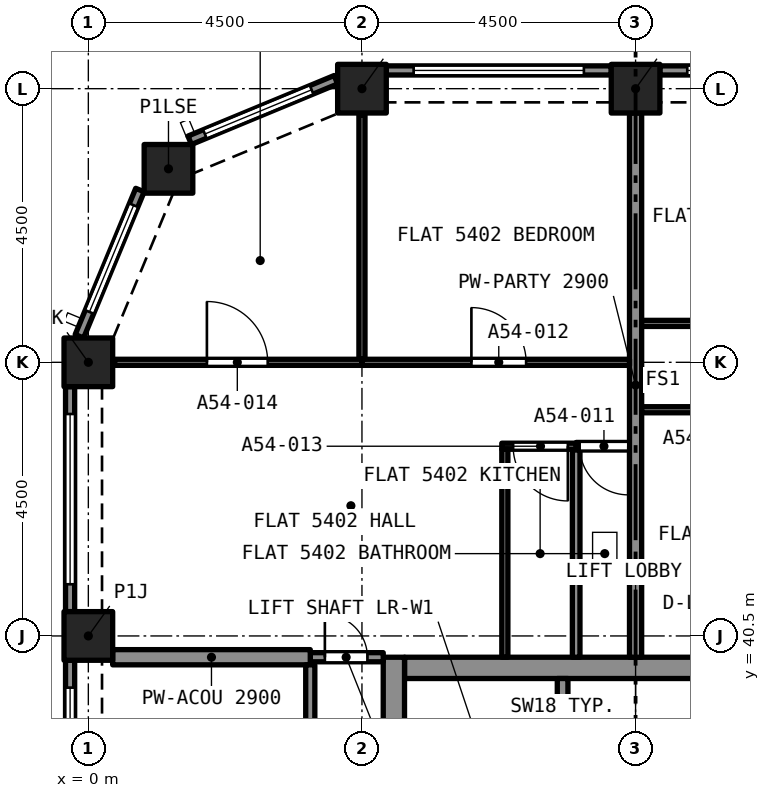
"""IFC4 building model, lengths in metres.
Left out: names, types, materials, properties, quantities, classifications, styles, units other than length and angle.
Written with IfcOpenShell. Run it as: python <this file> out.ifc"""

import sys

from ifc_helpers import new_model, si_unit, direction, frame, frame_2d, origin, origin_2d, place, context, subcontext, project, spatial, rectangle, extrude, element, fill, save


model = new_model("IFC4")
c1 = context("Model", 3, precision=1e-05, world=origin(), true_north=direction((0.0, 1.0)))
c2 = subcontext(c1, "Body", "Model", "MODEL_VIEW")
j1 = project(units=[si_unit("LENGTHUNIT", "METRE"), si_unit("PLANEANGLEUNIT", "RADIAN")], contexts=[c1])
p1 = place(None, origin())
s1 = spatial("IfcSite", under=j1, at=p1, CompositionType="ELEMENT")
p2 = place(p1, origin())
s2 = spatial("IfcBuilding", under=s1, at=p2, CompositionType="ELEMENT")
p3 = place(p2, frame((0.0, 0.0, 195.5)))
s3 = spatial("IfcBuildingStorey", under=s2, at=p3, CompositionType="ELEMENT", Elevation=195.5)
for number, where, z_axis, x_axis in (
    (1, (0.0, 40.5, 0.0), (0.0, 0.0, 1.0), (1.0, 0.0, 0.0)),
    (2, (0.0, 45.0, 0.0), (0.0, 0.0, 1.0), (1.0, 0.0, 0.0)),
    (3, (1.318, 48.182, 0.0), (0.0, 0.0, 1.0), (1.0, 0.0, 0.0)),
    (4, (4.5, 49.5, 0.0), (0.0, 0.0, 1.0), (1.0, 0.0, 0.0)),
    (5, (9.0, 49.5, 0.0), (0.0, 0.0, 1.0), (1.0, 0.0, 0.0)),
):
    element("IfcColumn", number, at=place(p3, frame(where, z_axis=z_axis, x_axis=x_axis)), inside=s3, PredefinedType="COLUMN", context=c2, shape_type="SweptSolid", body=[
        extrude(rectangle(XDim=0.8, YDim=0.8, at=origin_2d()), origin(), (0.0, 0.0, 1.0), 3.2),
    ])
p4 = place(p3, frame((5.2, 39.975, 0.0), z_axis=(0.0, 0.0, 1.0), x_axis=(1.0, 0.0, 0.0)))
e6 = element("IfcWall", 6, at=p4, inside=s3, PredefinedType="SOLIDWALL", context=c2, shape_type="SweptSolid", body=[
    extrude(rectangle(XDim=7.6, YDim=0.35, at=frame_2d((3.8, 0.0))), origin(), (0.0, 0.0, 1.0), 3.2),
])
p5 = place(p3, frame((5.025, 27.35, 0.0), z_axis=(0.0, 0.0, 1.0), x_axis=(0.0, 1.0, 0.0)))
e7 = element("IfcWall", 7, at=p5, inside=s3, PredefinedType="SOLIDWALL", context=c2, shape_type="SweptSolid", body=[
    extrude(rectangle(XDim=12.8, YDim=0.35, at=frame_2d((6.4, 0.0))), origin(), (0.0, 0.0, 1.0), 3.2),
])
p6 = place(p5, frame((8.6, 0.0, 0.0)))
e8 = element("IfcOpeningElement", 8, at=p6, cuts=e7, PredefinedType="OPENING", context=c2, shape_type="SweptSolid", body=[
    extrude(rectangle(XDim=1.2, YDim=2.1, at=frame_2d((0.6, 1.05))), frame((0.0, 0.185, 0.0), z_axis=(0.0, -1.0, 0.0), x_axis=(1.0, 0.0, 0.0)), (0.0, 0.0, 1.0), 0.37),
])
p7 = place(p3, frame((9.4, 49.8, 0.0), z_axis=(0.0, 0.0, 1.0), x_axis=(1.0, 0.0, 0.0)))
e9 = element("IfcWall", 9, at=p7, inside=s3, PredefinedType="SOLIDWALL", context=c2, shape_type="SweptSolid", body=[
    extrude(rectangle(XDim=3.7, YDim=0.15, at=frame_2d((1.85, 0.0))), origin(), (0.0, 0.0, 1.0), 3.2),
])
p8 = place(p7, frame((0.45, 0.0, 0.45)))
e10 = element("IfcOpeningElement", 10, at=p8, cuts=e9, PredefinedType="OPENING", context=c2, shape_type="SweptSolid", body=[
    extrude(rectangle(XDim=2.8, YDim=1.95, at=frame_2d((1.4, 0.975))), frame((0.0, 0.085, 0.0), z_axis=(0.0, -1.0, 0.0), x_axis=(1.0, 0.0, 0.0)), (0.0, 0.0, 1.0), 0.17),
])
p9 = place(p3, frame((4.9, 49.8, 0.0), z_axis=(0.0, 0.0, 1.0), x_axis=(1.0, 0.0, 0.0)))
e11 = element("IfcWall", 11, at=p9, inside=s3, PredefinedType="SOLIDWALL", context=c2, shape_type="SweptSolid", body=[
    extrude(rectangle(XDim=3.7, YDim=0.15, at=frame_2d((1.85, 0.0))), origin(), (0.0, 0.0, 1.0), 3.2),
])
p10 = place(p9, frame((0.45, 0.0, 0.45)))
e12 = element("IfcOpeningElement", 12, at=p10, cuts=e11, PredefinedType="OPENING", context=c2, shape_type="SweptSolid", body=[
    extrude(rectangle(XDim=2.8, YDim=1.95, at=frame_2d((1.4, 0.975))), frame((0.0, 0.085, 0.0), z_axis=(0.0, -1.0, 0.0), x_axis=(1.0, 0.0, 0.0)), (0.0, 0.0, 1.0), 0.17),
])
p11 = place(p3, frame((1.667, 48.651, 0.0), z_axis=(0.0, 0.0, 1.0), x_axis=(0.923885342263, 0.382669406082, 0.0)))
e13 = element("IfcWall", 13, at=p11, inside=s3, PredefinedType="SOLIDWALL", context=c2, shape_type="SweptSolid", body=[
    extrude(rectangle(XDim=2.602, YDim=0.15, at=frame_2d((1.301, 0.0))), origin(), (0.0, 0.0, 1.0), 3.2),
])
p12 = place(p11, frame((0.27, 0.0, 0.45)))
e14 = element("IfcOpeningElement", 14, at=p12, cuts=e13, PredefinedType="OPENING", context=c2, shape_type="SweptSolid", body=[
    extrude(rectangle(XDim=1.9, YDim=1.95, at=frame_2d((0.95, 0.975))), frame((0.0, 0.085, 0.0), z_axis=(0.0, -1.0, 0.0), x_axis=(1.0, 0.0, 0.0)), (0.0, 0.0, 1.0), 0.17),
])
p13 = place(p3, frame((-0.147, 45.429, 0.0), z_axis=(0.0, 0.0, 1.0), x_axis=(0.382669406082, 0.923885342263, 0.0)))
e15 = element("IfcWall", 15, at=p13, inside=s3, PredefinedType="SOLIDWALL", context=c2, shape_type="SweptSolid", body=[
    extrude(rectangle(XDim=2.602, YDim=0.15, at=frame_2d((1.301, 0.0))), origin(), (0.0, 0.0, 1.0), 3.2),
])
p14 = place(p13, frame((0.432, 0.0, 0.45)))
e16 = element("IfcOpeningElement", 16, at=p14, cuts=e15, PredefinedType="OPENING", context=c2, shape_type="SweptSolid", body=[
    extrude(rectangle(XDim=1.9, YDim=1.95, at=frame_2d((0.95, 0.975))), frame((0.0, 0.085, 0.0), z_axis=(0.0, -1.0, 0.0), x_axis=(1.0, 0.0, 0.0)), (0.0, 0.0, 1.0), 0.17),
])
p15 = place(p3, frame((-0.3, 40.9, 0.0), z_axis=(0.0, 0.0, 1.0), x_axis=(0.0, 1.0, 0.0)))
e17 = element("IfcWall", 17, at=p15, inside=s3, PredefinedType="SOLIDWALL", context=c2, shape_type="SweptSolid", body=[
    extrude(rectangle(XDim=3.7, YDim=0.15, at=frame_2d((1.85, 0.0))), origin(), (0.0, 0.0, 1.0), 3.2),
])
p16 = place(p15, frame((0.45, 0.0, 0.45)))
e18 = element("IfcOpeningElement", 18, at=p16, cuts=e17, PredefinedType="OPENING", context=c2, shape_type="SweptSolid", body=[
    extrude(rectangle(XDim=2.8, YDim=1.95, at=frame_2d((1.4, 0.975))), frame((0.0, 0.085, 0.0), z_axis=(0.0, -1.0, 0.0), x_axis=(1.0, 0.0, 0.0)), (0.0, 0.0, 1.0), 0.17),
])
p17 = place(p3, frame((-0.3, 36.4, 0.0), z_axis=(0.0, 0.0, 1.0), x_axis=(0.0, 1.0, 0.0)))
e19 = element("IfcWall", 19, at=p17, inside=s3, PredefinedType="SOLIDWALL", context=c2, shape_type="SweptSolid", body=[
    extrude(rectangle(XDim=3.7, YDim=0.15, at=frame_2d((1.85, 0.0))), origin(), (0.0, 0.0, 1.0), 3.2),
])
p18 = place(p17, frame((0.45, 0.0, 0.45)))
e20 = element("IfcOpeningElement", 20, at=p18, cuts=e19, PredefinedType="OPENING", context=c2, shape_type="SweptSolid", body=[
    extrude(rectangle(XDim=2.8, YDim=1.95, at=frame_2d((1.4, 0.975))), frame((0.0, 0.085, 0.0), z_axis=(0.0, -1.0, 0.0), x_axis=(1.0, 0.0, 0.0)), (0.0, 0.0, 1.0), 0.17),
])
p19 = place(p3, frame((8.9, 43.62, 0.0), z_axis=(0.0, 0.0, 1.0), x_axis=(-1.0, 0.0, 0.0)))
e21 = element("IfcWall", 21, at=p19, inside=s3, PredefinedType="PARTITIONING", context=c2, shape_type="SweptSolid", body=[
    extrude(rectangle(XDim=0.877, YDim=0.125, at=frame_2d((0.438, 0.0))), origin(), (0.0, 0.0, 1.0), 2.9),
])
p20 = place(p19, frame((0.02, 0.0, 0.0)))
e22 = element("IfcOpeningElement", 22, at=p20, cuts=e21, PredefinedType="OPENING", context=c2, shape_type="SweptSolid", body=[
    extrude(rectangle(XDim=0.8, YDim=2.1, at=frame_2d((0.4, 1.05))), frame((0.0, 0.073, 0.0), z_axis=(0.0, -1.0, 0.0), x_axis=(1.0, 0.0, 0.0)), (0.0, 0.0, 1.0), 0.145),
])
p21 = place(p3, frame((8.023, 40.15, 0.0), z_axis=(0.0, 0.0, 1.0), x_axis=(0.0, 1.0, 0.0)))
e23 = element("IfcWall", 23, at=p21, inside=s3, PredefinedType="PARTITIONING", context=c2, shape_type="SweptSolid", body=[
    extrude(rectangle(XDim=3.408, YDim=0.125, at=frame_2d((1.704, 0.0))), origin(), (0.0, 0.0, 1.0), 2.9),
])
p22 = place(p3, frame((9.0, 40.15, 0.0), z_axis=(0.0, 0.0, 1.0), x_axis=(0.0, 1.0, 0.0)))
e24 = element("IfcWall", 24, at=p22, inside=s3, PredefinedType="PARTITIONING", context=c2, shape_type="SweptSolid", body=[
    extrude(rectangle(XDim=8.95, YDim=0.2, at=frame_2d((4.475, 0.0))), origin(), (0.0, 0.0, 1.0), 2.9),
])
p23 = place(p3, frame((4.5, 45.0, 0.0), z_axis=(0.0, 0.0, 1.0), x_axis=(1.0, 0.0, 0.0)))
e25 = element("IfcWall", 25, at=p23, inside=s3, PredefinedType="PARTITIONING", context=c2, shape_type="SweptSolid", body=[
    extrude(rectangle(XDim=4.4, YDim=0.1, at=frame_2d((2.2, 0.0))), origin(), (0.0, 0.0, 1.0), 2.9),
])
p24 = place(p23, frame((1.8, 0.0, 0.0)))
e26 = element("IfcOpeningElement", 26, at=p24, cuts=e25, PredefinedType="OPENING", context=c2, shape_type="SweptSolid", body=[
    extrude(rectangle(XDim=0.9, YDim=2.1, at=frame_2d((0.45, 1.05))), frame((0.0, 0.06, 0.0), z_axis=(0.0, -1.0, 0.0), x_axis=(1.0, 0.0, 0.0)), (0.0, 0.0, 1.0), 0.12),
])
p25 = place(p3, frame((4.5, 45.05, 0.0), z_axis=(0.0, 0.0, 1.0), x_axis=(0.0, 1.0, 0.0)))
e27 = element("IfcWall", 27, at=p25, inside=s3, PredefinedType="PARTITIONING", context=c2, shape_type="SweptSolid", body=[
    extrude(rectangle(XDim=4.017, YDim=0.1, at=frame_2d((2.009, 0.0))), origin(), (0.0, 0.0, 1.0), 2.9),
])
p26 = place(p3, frame((8.023, 43.62, 0.0), z_axis=(0.0, 0.0, 1.0), x_axis=(-1.0, 0.0, 0.0)))
e28 = element("IfcWall", 28, at=p26, inside=s3, PredefinedType="PARTITIONING", context=c2, shape_type="SweptSolid", body=[
    extrude(rectangle(XDim=1.223, YDim=0.1, at=frame_2d((0.611, 0.0))), origin(), (0.0, 0.0, 1.0), 2.9),
])
p27 = place(p26, frame((0.136, 0.0, 0.0)))
e29 = element("IfcOpeningElement", 29, at=p27, cuts=e28, PredefinedType="OPENING", context=c2, shape_type="SweptSolid", body=[
    extrude(rectangle(XDim=0.9, YDim=2.1, at=frame_2d((0.45, 1.05))), frame((0.0, 0.06, 0.0), z_axis=(0.0, -1.0, 0.0), x_axis=(1.0, 0.0, 0.0)), (0.0, 0.0, 1.0), 0.12),
])
p28 = place(p3, frame((6.85, 40.15, 0.0), z_axis=(0.0, 0.0, 1.0), x_axis=(0.0, 1.0, 0.0)))
e30 = element("IfcWall", 30, at=p28, inside=s3, PredefinedType="PARTITIONING", context=c2, shape_type="SweptSolid", body=[
    extrude(rectangle(XDim=3.42, YDim=0.1, at=frame_2d((1.71, 0.0))), origin(), (0.0, 0.0, 1.0), 2.9),
])
p29 = place(p3, frame((0.433, 45.0, 0.0), z_axis=(0.0, 0.0, 1.0), x_axis=(1.0, 0.0, 0.0)))
e31 = element("IfcWall", 31, at=p29, inside=s3, PredefinedType="PARTITIONING", context=c2, shape_type="SweptSolid", body=[
    extrude(rectangle(XDim=4.067, YDim=0.1, at=frame_2d((2.034, 0.0))), origin(), (0.0, 0.0, 1.0), 2.9),
])
p30 = place(p29, frame((1.517, 0.0, 0.0)))
e32 = element("IfcOpeningElement", 32, at=p30, cuts=e31, PredefinedType="OPENING", context=c2, shape_type="SweptSolid", body=[
    extrude(rectangle(XDim=1.0, YDim=2.1, at=frame_2d((0.5, 1.05))), frame((0.0, 0.06, 0.0), z_axis=(0.0, -1.0, 0.0), x_axis=(1.0, 0.0, 0.0)), (0.0, 0.0, 1.0), 0.12),
])
p31 = place(p3, frame((3.65, 40.15, 0.0), z_axis=(0.0, 0.0, 1.0), x_axis=(1.0, 0.0, 0.0)))
e33 = element("IfcWall", 33, at=p31, inside=s3, PredefinedType="PARTITIONING", context=c2, shape_type="SweptSolid", body=[
    extrude(rectangle(XDim=1.2, YDim=0.15, at=frame_2d((0.6, 0.0))), origin(), (0.0, 0.0, 1.0), 2.9),
])
p32 = place(p31, frame((0.24, 0.0, 0.0)))
e34 = element("IfcOpeningElement", 34, at=p32, cuts=e33, PredefinedType="OPENING", context=c2, shape_type="SweptSolid", body=[
    extrude(rectangle(XDim=0.7, YDim=2.1, at=frame_2d((0.35, 1.05))), frame((0.0, 0.085, 0.0), z_axis=(0.0, -1.0, 0.0), x_axis=(1.0, 0.0, 0.0)), (0.0, 0.0, 1.0), 0.17),
])
p33 = place(p3, frame((0.4, 40.15, 0.0), z_axis=(0.0, 0.0, 1.0), x_axis=(1.0, 0.0, 0.0)))
e35 = element("IfcWall", 35, at=p33, inside=s3, PredefinedType="PARTITIONING", context=c2, shape_type="SweptSolid", body=[
    extrude(rectangle(XDim=3.25, YDim=0.25, at=frame_2d((1.625, 0.0))), origin(), (0.0, 0.0, 1.0), 2.9),
])
p34 = place(p3, frame((12.201, 44.22, 0.0), z_axis=(0.0, 0.0, 1.0), x_axis=(-1.0, 0.0, 0.0)))
e36 = element("IfcWall", 36, at=p34, inside=s3, PredefinedType="PARTITIONING", context=c2, shape_type="SweptSolid", body=[
    extrude(rectangle(XDim=3.101, YDim=0.1, at=frame_2d((1.55, 0.0))), origin(), (0.0, 0.0, 1.0), 2.9),
])
p35 = place(p34, frame((1.15, 0.0, 0.0)))
e37 = element("IfcOpeningElement", 37, at=p35, cuts=e36, PredefinedType="OPENING", context=c2, shape_type="SweptSolid", body=[
    extrude(rectangle(XDim=0.9, YDim=2.1, at=frame_2d((0.45, 1.05))), frame((0.0, 0.06, 0.0), z_axis=(0.0, -1.0, 0.0), x_axis=(1.0, 0.0, 0.0)), (0.0, 0.0, 1.0), 0.12),
])
p36 = place(p3, frame((9.1, 45.64, 0.0), z_axis=(0.0, 0.0, 1.0), x_axis=(1.0, 0.0, 0.0)))
e38 = element("IfcWall", 38, at=p36, inside=s3, PredefinedType="PARTITIONING", context=c2, shape_type="SweptSolid", body=[
    extrude(rectangle(XDim=4.4, YDim=0.1, at=frame_2d((2.2, 0.0))), origin(), (0.0, 0.0, 1.0), 2.9),
])
p37 = place(p36, frame((1.65, 0.0, 0.0)))
e39 = element("IfcOpeningElement", 39, at=p37, cuts=e38, PredefinedType="OPENING", context=c2, shape_type="SweptSolid", body=[
    extrude(rectangle(XDim=1.0, YDim=2.1, at=frame_2d((0.5, 1.05))), frame((0.0, 0.06, 0.0), z_axis=(0.0, -1.0, 0.0), x_axis=(1.0, 0.0, 0.0)), (0.0, 0.0, 1.0), 0.12),
])
p38 = place(p3, frame((3.65, 36.0, 0.0), z_axis=(0.0, 0.0, 1.0), x_axis=(0.0, 1.0, 0.0)))
e40 = element("IfcWall", 40, at=p38, inside=s3, PredefinedType="PARTITIONING", context=c2, shape_type="SweptSolid", body=[
    extrude(rectangle(XDim=4.025, YDim=0.15, at=frame_2d((2.012, 0.0))), origin(), (0.0, 0.0, 1.0), 2.9),
])
p39 = place(p38, frame((1.575, 0.0, 0.0)))
e41 = element("IfcOpeningElement", 41, at=p39, cuts=e40, PredefinedType="OPENING", context=c2, shape_type="SweptSolid", body=[
    extrude(rectangle(XDim=1.0, YDim=2.1, at=frame_2d((0.5, 1.05))), frame((0.0, 0.085, 0.0), z_axis=(0.0, -1.0, 0.0), x_axis=(1.0, 0.0, 0.0)), (0.0, 0.0, 1.0), 0.17),
])
p40 = place(p3, frame((7.8, 37.5, 0.0), z_axis=(0.0, 0.0, 1.0), x_axis=(0.0, 1.0, 0.0)))
e42 = element("IfcWall", 42, at=p40, inside=s3, PredefinedType="SOLIDWALL", context=c2, shape_type="SweptSolid", body=[
    extrude(rectangle(XDim=2.3, YDim=0.175, at=frame_2d((1.15, 0.0))), origin(), (0.0, 0.0, 1.0), 2.9),
])
p41 = place(p8, origin())
e43 = element("IfcWindow", 43, at=p41, inside=s3, PartitioningType="SINGLE_PANEL", PredefinedType="WINDOW", context=c2, shape_type="SweptSolid", body=[
    extrude(rectangle(XDim=2.8, YDim=1.95, at=frame_2d((1.4, 0.975))), frame((0.0, 0.03, 0.0), z_axis=(0.0, -1.0, 0.0), x_axis=(1.0, 0.0, 0.0)), (0.0, 0.0, 1.0), 0.06),
])
fill(e10, e43)
p42 = place(p10, origin())
e44 = element("IfcWindow", 44, at=p42, inside=s3, PartitioningType="SINGLE_PANEL", PredefinedType="WINDOW", context=c2, shape_type="SweptSolid", body=[
    extrude(rectangle(XDim=2.8, YDim=1.95, at=frame_2d((1.4, 0.975))), frame((0.0, 0.03, 0.0), z_axis=(0.0, -1.0, 0.0), x_axis=(1.0, 0.0, 0.0)), (0.0, 0.0, 1.0), 0.06),
])
fill(e12, e44)
p43 = place(p12, origin())
e45 = element("IfcWindow", 45, at=p43, inside=s3, PartitioningType="SINGLE_PANEL", PredefinedType="WINDOW", context=c2, shape_type="SweptSolid", body=[
    extrude(rectangle(XDim=1.9, YDim=1.95, at=frame_2d((0.95, 0.975))), frame((0.0, 0.03, 0.0), z_axis=(0.0, -1.0, 0.0), x_axis=(1.0, 0.0, 0.0)), (0.0, 0.0, 1.0), 0.06),
])
fill(e14, e45)
p44 = place(p14, origin())
e46 = element("IfcWindow", 46, at=p44, inside=s3, PartitioningType="SINGLE_PANEL", PredefinedType="WINDOW", context=c2, shape_type="SweptSolid", body=[
    extrude(rectangle(XDim=1.9, YDim=1.95, at=frame_2d((0.95, 0.975))), frame((0.0, 0.03, 0.0), z_axis=(0.0, -1.0, 0.0), x_axis=(1.0, 0.0, 0.0)), (0.0, 0.0, 1.0), 0.06),
])
fill(e16, e46)
p45 = place(p16, origin())
e47 = element("IfcWindow", 47, at=p45, inside=s3, PartitioningType="SINGLE_PANEL", PredefinedType="WINDOW", context=c2, shape_type="SweptSolid", body=[
    extrude(rectangle(XDim=2.8, YDim=1.95, at=frame_2d((1.4, 0.975))), frame((0.0, 0.03, 0.0), z_axis=(0.0, -1.0, 0.0), x_axis=(1.0, 0.0, 0.0)), (0.0, 0.0, 1.0), 0.06),
])
fill(e18, e47)
p46 = place(p18, origin())
e48 = element("IfcWindow", 48, at=p46, inside=s3, PartitioningType="SINGLE_PANEL", PredefinedType="WINDOW", context=c2, shape_type="SweptSolid", body=[
    extrude(rectangle(XDim=2.8, YDim=1.95, at=frame_2d((1.4, 0.975))), frame((0.0, 0.03, 0.0), z_axis=(0.0, -1.0, 0.0), x_axis=(1.0, 0.0, 0.0)), (0.0, 0.0, 1.0), 0.06),
])
fill(e20, e48)
p47 = place(p20, origin())
e49 = element("IfcDoor", 49, at=p47, inside=s3, OperationType="SINGLE_SWING_LEFT", PredefinedType="DOOR", context=c2, shape_type="SweptSolid", body=[
    extrude(rectangle(XDim=0.8, YDim=2.1, at=frame_2d((0.4, 1.05))), frame((0.0, 0.025, 0.0), z_axis=(0.0, -1.0, 0.0), x_axis=(1.0, 0.0, 0.0)), (0.0, 0.0, 1.0), 0.05),
])
fill(e22, e49)
p48 = place(p24, origin())
e50 = element("IfcDoor", 50, at=p48, inside=s3, OperationType="SINGLE_SWING_RIGHT", PredefinedType="DOOR", context=c2, shape_type="SweptSolid", body=[
    extrude(rectangle(XDim=0.9, YDim=2.1, at=frame_2d((0.45, 1.05))), frame((0.0, 0.025, 0.0), z_axis=(0.0, -1.0, 0.0), x_axis=(1.0, 0.0, 0.0)), (0.0, 0.0, 1.0), 0.05),
])
fill(e26, e50)
p49 = place(p27, origin())
e51 = element("IfcDoor", 51, at=p49, inside=s3, OperationType="SINGLE_SWING_LEFT", PredefinedType="DOOR", context=c2, shape_type="SweptSolid", body=[
    extrude(rectangle(XDim=0.9, YDim=2.1, at=frame_2d((0.45, 1.05))), frame((0.0, 0.025, 0.0), z_axis=(0.0, -1.0, 0.0), x_axis=(1.0, 0.0, 0.0)), (0.0, 0.0, 1.0), 0.05),
])
fill(e29, e51)
p50 = place(p30, origin())
e52 = element("IfcDoor", 52, at=p50, inside=s3, OperationType="SINGLE_SWING_LEFT", PredefinedType="DOOR", context=c2, shape_type="SweptSolid", body=[
    extrude(rectangle(XDim=1.0, YDim=2.1, at=frame_2d((0.5, 1.05))), frame((0.0, 0.025, 0.0), z_axis=(0.0, -1.0, 0.0), x_axis=(1.0, 0.0, 0.0)), (0.0, 0.0, 1.0), 0.05),
])
fill(e32, e52)
p51 = place(p32, origin())
e53 = element("IfcDoor", 53, at=p51, inside=s3, OperationType="SINGLE_SWING_LEFT", PredefinedType="DOOR", context=c2, shape_type="SweptSolid", body=[
    extrude(rectangle(XDim=0.7, YDim=2.1, at=frame_2d((0.35, 1.05))), frame((0.0, 0.025, 0.0), z_axis=(0.0, -1.0, 0.0), x_axis=(1.0, 0.0, 0.0)), (0.0, 0.0, 1.0), 0.05),
])
fill(e34, e53)
save(model, sys.argv[1])
